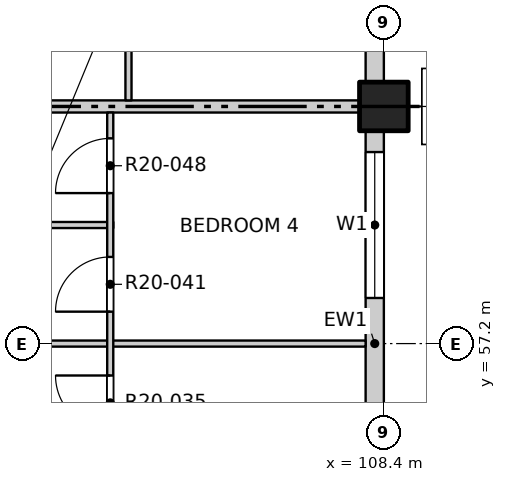
"""IFC4 building model, lengths in metres.
Left out: names, types, materials, properties, quantities, classifications, styles, units other than length and angle.
Written with IfcOpenShell. Run it as: python <this file> out.ifc"""

import sys

from ifc_helpers import new_model, si_unit, direction, frame, frame_2d, origin, origin_2d, place, context, subcontext, project, spatial, rectangle, extrude, element, fill, save


model = new_model("IFC4")
c1 = context("Model", 3, precision=1e-05, world=origin(), true_north=direction((0.0, 1.0)))
c2 = subcontext(c1, "Body", "Model", "MODEL_VIEW")
j1 = project(units=[si_unit("LENGTHUNIT", "METRE"), si_unit("PLANEANGLEUNIT", "RADIAN")], contexts=[c1])
p1 = place(None, origin())
s1 = spatial("IfcSite", under=j1, at=p1, CompositionType="ELEMENT")
p2 = place(p1, origin())
s2 = spatial("IfcBuilding", under=s1, at=p2, CompositionType="ELEMENT")
p3 = place(p2, frame((0.0, 0.0, 210.9)))
s3 = spatial("IfcBuildingStorey", under=s2, at=p3, CompositionType="ELEMENT", Elevation=210.9)
p4 = place(p3, frame((108.4, 61.1, -0.25), z_axis=(0.0, 0.0, 1.0), x_axis=(1.0, 0.0, 0.0)))
e1 = element("IfcColumn", 1, at=p4, inside=s3, PredefinedType="COLUMN", context=c2, shape_type="SweptSolid", body=[
    extrude(rectangle(XDim=0.8, YDim=0.8, at=origin_2d()), origin(), (0.0, 0.0, 1.0), 3.4),
])
p5 = place(p3, frame((108.25, 53.7, 0.0), z_axis=(0.0, 0.0, 1.0), x_axis=(0.0, 1.0, 0.0)))
e2 = element("IfcWall", 2, at=p5, inside=s3, PredefinedType="SOLIDWALL", context=c2, shape_type="SweptSolid", body=[
    extrude(rectangle(XDim=7.0, YDim=0.3, at=frame_2d((3.5, 0.0))), origin(), (0.0, 0.0, 1.0), 2.7),
])
p6 = place(p5, frame((0.65, 0.0, 0.0)))
e3 = element("IfcOpeningElement", 3, at=p6, cuts=e2, PredefinedType="OPENING", context=c2, shape_type="SweptSolid", body=[
    extrude(rectangle(XDim=1.8, YDim=2.4, at=frame_2d((0.9, 1.2))), frame((0.0, 0.16, 0.0), z_axis=(0.0, -1.0, 0.0), x_axis=(1.0, 0.0, 0.0)), (0.0, 0.0, 1.0), 0.32),
])
p7 = place(p5, frame((4.25, 0.0, 0.9)))
e4 = element("IfcOpeningElement", 4, at=p7, cuts=e2, PredefinedType="OPENING", context=c2, shape_type="SweptSolid", body=[
    extrude(rectangle(XDim=2.4, YDim=1.8, at=frame_2d((1.2, 0.9))), frame((0.0, 0.16, 0.0), z_axis=(0.0, -1.0, 0.0), x_axis=(1.0, 0.0, 0.0)), (0.0, 0.0, 1.0), 0.32),
])
p8 = place(p3, frame((108.25, 61.5, 0.0), z_axis=(0.0, 0.0, 1.0), x_axis=(0.0, 1.0, 0.0)))
e5 = element("IfcWall", 5, at=p8, inside=s3, PredefinedType="SOLIDWALL", context=c2, shape_type="SweptSolid", body=[
    extrude(rectangle(XDim=7.0, YDim=0.3, at=frame_2d((3.5, 0.0))), origin(), (0.0, 0.0, 1.0), 2.7),
])
p9 = place(p8, frame((0.65, 0.0, 0.0)))
e6 = element("IfcOpeningElement", 6, at=p9, cuts=e5, PredefinedType="OPENING", context=c2, shape_type="SweptSolid", body=[
    extrude(rectangle(XDim=1.8, YDim=2.4, at=frame_2d((0.9, 1.2))), frame((0.0, 0.16, 0.0), z_axis=(0.0, -1.0, 0.0), x_axis=(1.0, 0.0, 0.0)), (0.0, 0.0, 1.0), 0.32),
])
p10 = place(p8, frame((4.25, 0.0, 0.9)))
e7 = element("IfcOpeningElement", 7, at=p10, cuts=e5, PredefinedType="OPENING", context=c2, shape_type="SweptSolid", body=[
    extrude(rectangle(XDim=2.4, YDim=1.8, at=frame_2d((1.2, 0.9))), frame((0.0, 0.16, 0.0), z_axis=(0.0, -1.0, 0.0), x_axis=(1.0, 0.0, 0.0)), (0.0, 0.0, 1.0), 0.32),
])
p11 = place(p3, frame((100.55, 57.2, 0.0), z_axis=(0.0, 0.0, 1.0), x_axis=(1.0, 0.0, 0.0)))
e8 = element("IfcWall", 8, at=p11, inside=s3, PredefinedType="PARTITIONING", context=c2, shape_type="SweptSolid", body=[
    extrude(rectangle(XDim=7.55, YDim=0.1, at=frame_2d((3.775, 0.0))), origin(), (0.0, 0.0, 1.0), 3.15),
])
p12 = place(p3, frame((100.55, 59.15, 0.0), z_axis=(0.0, 0.0, 1.0), x_axis=(1.0, 0.0, 0.0)))
e9 = element("IfcWall", 9, at=p12, inside=s3, PredefinedType="PARTITIONING", context=c2, shape_type="SweptSolid", body=[
    extrude(rectangle(XDim=3.4, YDim=0.1, at=frame_2d((1.7, 0.0))), origin(), (0.0, 0.0, 1.0), 3.15),
])
p13 = place(p3, frame((96.6, 61.1, 0.0), z_axis=(0.0, 0.0, 1.0), x_axis=(1.0, 0.0, 0.0)))
e10 = element("IfcWall", 10, at=p13, inside=s3, PredefinedType="PARTITIONING", context=c2, shape_type="SweptSolid", body=[
    extrude(rectangle(XDim=11.5, YDim=0.2, at=frame_2d((5.75, 0.0))), origin(), (0.0, 0.0, 1.0), 2.55),
])
p14 = place(p3, frame((103.9, 41.9, 0.0), z_axis=(0.0, 0.0, 1.0), x_axis=(0.0, 1.0, 0.0)))
e11 = element("IfcWall", 11, at=p14, inside=s3, PredefinedType="PARTITIONING", context=c2, shape_type="SweptSolid", body=[
    extrude(rectangle(XDim=19.1, YDim=0.1, at=frame_2d((9.55, 0.0))), origin(), (0.0, 0.0, 1.0), 3.15),
])
p15 = place(p14, frame((1.05, 0.0, 0.0)))
e12 = element("IfcOpeningElement", 12, at=p15, cuts=e11, PredefinedType="OPENING", context=c2, shape_type="SweptSolid", body=[
    extrude(rectangle(XDim=1.2, YDim=2.1, at=frame_2d((0.6, 1.05))), frame((0.0, 0.06, 0.0), z_axis=(0.0, -1.0, 0.0), x_axis=(1.0, 0.0, 0.0)), (0.0, 0.0, 1.0), 0.12),
])
p16 = place(p14, frame((4.125, 0.0, 0.0)))
e13 = element("IfcOpeningElement", 13, at=p16, cuts=e11, PredefinedType="OPENING", context=c2, shape_type="SweptSolid", body=[
    extrude(rectangle(XDim=0.9, YDim=2.1, at=frame_2d((0.45, 1.05))), frame((0.0, 0.06, 0.0), z_axis=(0.0, -1.0, 0.0), x_axis=(1.0, 0.0, 0.0)), (0.0, 0.0, 1.0), 0.12),
])
p17 = place(p14, frame((6.075, 0.0, 0.0)))
e14 = element("IfcOpeningElement", 14, at=p17, cuts=e11, PredefinedType="OPENING", context=c2, shape_type="SweptSolid", body=[
    extrude(rectangle(XDim=0.9, YDim=2.1, at=frame_2d((0.45, 1.05))), frame((0.0, 0.06, 0.0), z_axis=(0.0, -1.0, 0.0), x_axis=(1.0, 0.0, 0.0)), (0.0, 0.0, 1.0), 0.12),
])
p18 = place(p14, frame((8.85, 0.0, 0.0)))
e15 = element("IfcOpeningElement", 15, at=p18, cuts=e11, PredefinedType="OPENING", context=c2, shape_type="SweptSolid", body=[
    extrude(rectangle(XDim=1.2, YDim=2.1, at=frame_2d((0.6, 1.05))), frame((0.0, 0.06, 0.0), z_axis=(0.0, -1.0, 0.0), x_axis=(1.0, 0.0, 0.0)), (0.0, 0.0, 1.0), 0.12),
])
p19 = place(p14, frame((11.925, 0.0, 0.0)))
e16 = element("IfcOpeningElement", 16, at=p19, cuts=e11, PredefinedType="OPENING", context=c2, shape_type="SweptSolid", body=[
    extrude(rectangle(XDim=0.9, YDim=2.1, at=frame_2d((0.45, 1.05))), frame((0.0, 0.06, 0.0), z_axis=(0.0, -1.0, 0.0), x_axis=(1.0, 0.0, 0.0)), (0.0, 0.0, 1.0), 0.12),
])
p20 = place(p14, frame((13.875, 0.0, 0.0)))
e17 = element("IfcOpeningElement", 17, at=p20, cuts=e11, PredefinedType="OPENING", context=c2, shape_type="SweptSolid", body=[
    extrude(rectangle(XDim=0.9, YDim=2.1, at=frame_2d((0.45, 1.05))), frame((0.0, 0.06, 0.0), z_axis=(0.0, -1.0, 0.0), x_axis=(1.0, 0.0, 0.0)), (0.0, 0.0, 1.0), 0.12),
])
p21 = place(p14, frame((15.825, 0.0, 0.0)))
e18 = element("IfcOpeningElement", 18, at=p21, cuts=e11, PredefinedType="OPENING", context=c2, shape_type="SweptSolid", body=[
    extrude(rectangle(XDim=0.9, YDim=2.1, at=frame_2d((0.45, 1.05))), frame((0.0, 0.06, 0.0), z_axis=(0.0, -1.0, 0.0), x_axis=(1.0, 0.0, 0.0)), (0.0, 0.0, 1.0), 0.12),
])
p22 = place(p14, frame((17.775, 0.0, 0.0)))
e19 = element("IfcOpeningElement", 19, at=p22, cuts=e11, PredefinedType="OPENING", context=c2, shape_type="SweptSolid", body=[
    extrude(rectangle(XDim=0.9, YDim=2.1, at=frame_2d((0.45, 1.05))), frame((0.0, 0.06, 0.0), z_axis=(0.0, -1.0, 0.0), x_axis=(1.0, 0.0, 0.0)), (0.0, 0.0, 1.0), 0.12),
])
p23 = place(p3, frame((104.2, 61.2, 0.0), z_axis=(0.0, 0.0, 1.0), x_axis=(0.0, 1.0, 0.0)))
e20 = element("IfcWall", 20, at=p23, inside=s3, PredefinedType="PARTITIONING", context=c2, shape_type="SweptSolid", body=[
    extrude(rectangle(XDim=26.9, YDim=0.1, at=frame_2d((13.45, 0.0))), origin(), (0.0, 0.0, 1.0), 3.15),
])
p24 = place(p23, frame((1.25, 0.0, 0.0)))
e21 = element("IfcOpeningElement", 21, at=p24, cuts=e20, PredefinedType="OPENING", context=c2, shape_type="SweptSolid", body=[
    extrude(rectangle(XDim=1.2, YDim=2.1, at=frame_2d((0.6, 1.05))), frame((0.0, 0.06, 0.0), z_axis=(0.0, -1.0, 0.0), x_axis=(1.0, 0.0, 0.0)), (0.0, 0.0, 1.0), 0.12),
])
p25 = place(p23, frame((5.15, 0.0, 0.0)))
e22 = element("IfcOpeningElement", 22, at=p25, cuts=e20, PredefinedType="OPENING", context=c2, shape_type="SweptSolid", body=[
    extrude(rectangle(XDim=1.2, YDim=2.1, at=frame_2d((0.6, 1.05))), frame((0.0, 0.06, 0.0), z_axis=(0.0, -1.0, 0.0), x_axis=(1.0, 0.0, 0.0)), (0.0, 0.0, 1.0), 0.12),
])
p26 = place(p23, frame((8.225, 0.0, 0.0)))
e23 = element("IfcOpeningElement", 23, at=p26, cuts=e20, PredefinedType="OPENING", context=c2, shape_type="SweptSolid", body=[
    extrude(rectangle(XDim=0.9, YDim=2.1, at=frame_2d((0.45, 1.05))), frame((0.0, 0.06, 0.0), z_axis=(0.0, -1.0, 0.0), x_axis=(1.0, 0.0, 0.0)), (0.0, 0.0, 1.0), 0.12),
])
p27 = place(p23, frame((10.175, 0.0, 0.0)))
e24 = element("IfcOpeningElement", 24, at=p27, cuts=e20, PredefinedType="OPENING", context=c2, shape_type="SweptSolid", body=[
    extrude(rectangle(XDim=0.9, YDim=2.1, at=frame_2d((0.45, 1.05))), frame((0.0, 0.06, 0.0), z_axis=(0.0, -1.0, 0.0), x_axis=(1.0, 0.0, 0.0)), (0.0, 0.0, 1.0), 0.12),
])
p28 = place(p23, frame((12.125, 0.0, 0.0)))
e25 = element("IfcOpeningElement", 25, at=p28, cuts=e20, PredefinedType="OPENING", context=c2, shape_type="SweptSolid", body=[
    extrude(rectangle(XDim=0.9, YDim=2.1, at=frame_2d((0.45, 1.05))), frame((0.0, 0.06, 0.0), z_axis=(0.0, -1.0, 0.0), x_axis=(1.0, 0.0, 0.0)), (0.0, 0.0, 1.0), 0.12),
])
p29 = place(p23, frame((14.075, 0.0, 0.0)))
e26 = element("IfcOpeningElement", 26, at=p29, cuts=e20, PredefinedType="OPENING", context=c2, shape_type="SweptSolid", body=[
    extrude(rectangle(XDim=0.9, YDim=2.1, at=frame_2d((0.45, 1.05))), frame((0.0, 0.06, 0.0), z_axis=(0.0, -1.0, 0.0), x_axis=(1.0, 0.0, 0.0)), (0.0, 0.0, 1.0), 0.12),
])
p30 = place(p23, frame((16.85, 0.0, 0.0)))
e27 = element("IfcOpeningElement", 27, at=p30, cuts=e20, PredefinedType="OPENING", context=c2, shape_type="SweptSolid", body=[
    extrude(rectangle(XDim=1.2, YDim=2.1, at=frame_2d((0.6, 1.05))), frame((0.0, 0.06, 0.0), z_axis=(0.0, -1.0, 0.0), x_axis=(1.0, 0.0, 0.0)), (0.0, 0.0, 1.0), 0.12),
])
p31 = place(p23, frame((19.925, 0.0, 0.0)))
e28 = element("IfcOpeningElement", 28, at=p31, cuts=e20, PredefinedType="OPENING", context=c2, shape_type="SweptSolid", body=[
    extrude(rectangle(XDim=0.9, YDim=2.1, at=frame_2d((0.45, 1.05))), frame((0.0, 0.06, 0.0), z_axis=(0.0, -1.0, 0.0), x_axis=(1.0, 0.0, 0.0)), (0.0, 0.0, 1.0), 0.12),
])
p32 = place(p23, frame((21.875, 0.0, 0.0)))
e29 = element("IfcOpeningElement", 29, at=p32, cuts=e20, PredefinedType="OPENING", context=c2, shape_type="SweptSolid", body=[
    extrude(rectangle(XDim=0.9, YDim=2.1, at=frame_2d((0.45, 1.05))), frame((0.0, 0.06, 0.0), z_axis=(0.0, -1.0, 0.0), x_axis=(1.0, 0.0, 0.0)), (0.0, 0.0, 1.0), 0.12),
])
p33 = place(p23, frame((24.65, 0.0, 0.0)))
e30 = element("IfcOpeningElement", 30, at=p33, cuts=e20, PredefinedType="OPENING", context=c2, shape_type="SweptSolid", body=[
    extrude(rectangle(XDim=1.2, YDim=2.1, at=frame_2d((0.6, 1.05))), frame((0.0, 0.06, 0.0), z_axis=(0.0, -1.0, 0.0), x_axis=(1.0, 0.0, 0.0)), (0.0, 0.0, 1.0), 0.12),
])
p34 = place(p7, origin())
e31 = element("IfcWindow", 31, at=p34, inside=s3, PartitioningType="DOUBLE_PANEL_VERTICAL", PredefinedType="WINDOW", context=c2, shape_type="SweptSolid", body=[
    extrude(rectangle(XDim=2.4, YDim=1.8, at=frame_2d((1.2, 0.9))), frame((0.0, 0.03, 0.0), z_axis=(0.0, -1.0, 0.0), x_axis=(1.0, 0.0, 0.0)), (0.0, 0.0, 1.0), 0.06),
])
fill(e4, e31)
p35 = place(p20, origin())
e32 = element("IfcDoor", 32, at=p35, inside=s3, OperationType="SINGLE_SWING_RIGHT", PredefinedType="DOOR", context=c2, shape_type="SweptSolid", body=[
    extrude(rectangle(XDim=0.9, YDim=2.1, at=frame_2d((0.45, 1.05))), frame((0.0, 0.025, 0.0), z_axis=(0.0, -1.0, 0.0), x_axis=(1.0, 0.0, 0.0)), (0.0, 0.0, 1.0), 0.05),
])
fill(e17, e32)
p36 = place(p21, origin())
e33 = element("IfcDoor", 33, at=p36, inside=s3, OperationType="SINGLE_SWING_LEFT", PredefinedType="DOOR", context=c2, shape_type="SweptSolid", body=[
    extrude(rectangle(XDim=0.9, YDim=2.1, at=frame_2d((0.45, 1.05))), frame((0.0, 0.025, 0.0), z_axis=(0.0, -1.0, 0.0), x_axis=(1.0, 0.0, 0.0)), (0.0, 0.0, 1.0), 0.05),
])
fill(e18, e33)
p37 = place(p22, origin())
e34 = element("IfcDoor", 34, at=p37, inside=s3, OperationType="SINGLE_SWING_LEFT", PredefinedType="DOOR", context=c2, shape_type="SweptSolid", body=[
    extrude(rectangle(XDim=0.9, YDim=2.1, at=frame_2d((0.45, 1.05))), frame((0.0, 0.025, 0.0), z_axis=(0.0, -1.0, 0.0), x_axis=(1.0, 0.0, 0.0)), (0.0, 0.0, 1.0), 0.05),
])
fill(e19, e34)
save(model, sys.argv[1])
